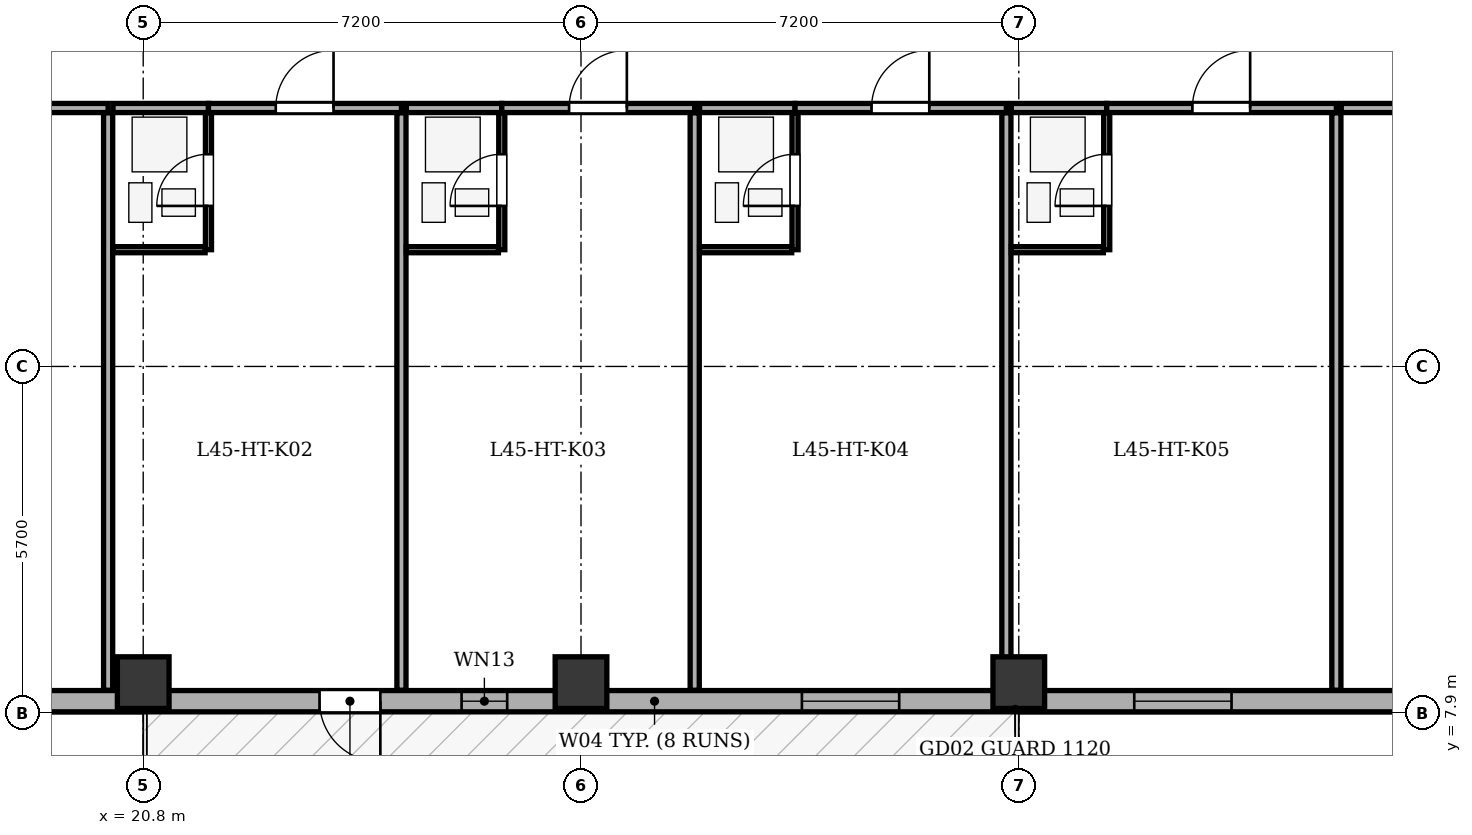
"""IFC4 building model, lengths in metres.
Left out: names, types, materials, properties, quantities, classifications, styles, units other than length and angle.
Written with IfcOpenShell. Run it as: python <this file> out.ifc"""

import sys

from ifc_helpers import new_model, si_unit, direction, frame, frame_2d, origin, origin_2d, place, context, subcontext, project, spatial, rectangle, extrude, element, fill, save


model = new_model("IFC4")
c1 = context("Model", 3, precision=1e-05, world=origin(), true_north=direction((0.0, 1.0)))
c2 = subcontext(c1, "Body", "Model", "MODEL_VIEW")
j1 = project(units=[si_unit("LENGTHUNIT", "METRE"), si_unit("PLANEANGLEUNIT", "RADIAN")], contexts=[c1])
p1 = place(None, origin())
s1 = spatial("IfcSite", under=j1, at=p1, CompositionType="ELEMENT")
p2 = place(p1, origin())
s2 = spatial("IfcBuilding", under=s1, at=p2, CompositionType="ELEMENT")
p3 = place(p2, frame((0.0, 0.0, 176.3)))
s3 = spatial("IfcBuildingStorey", under=s2, at=p3, CompositionType="ELEMENT", Elevation=176.3)
for number, where, z_axis, x_axis in (
    (1, (20.8, 8.4, 0.0), (0.0, 0.0, 1.0), (1.0, 0.0, 0.0)),
    (2, (28.0, 8.4, 0.0), (0.0, 0.0, 1.0), (1.0, 0.0, 0.0)),
    (3, (35.2, 8.4, 0.0), (0.0, 0.0, 1.0), (1.0, 0.0, 0.0)),
):
    element("IfcColumn", number, at=place(p3, frame(where, z_axis=z_axis, x_axis=x_axis)), inside=s3, PredefinedType="COLUMN", context=c2, shape_type="SweptSolid", body=[
        extrude(rectangle(XDim=0.85, YDim=0.85, at=origin_2d()), origin(), (0.0, 0.0, 1.0), 3.5),
    ])
p4 = place(p3, frame((50.7, 8.095, 0.0), z_axis=(0.0, 0.0, 1.0), x_axis=(-1.0, 0.0, 0.0)))
e4 = element("IfcWall", 4, at=p4, inside=s3, PredefinedType="STANDARD", context=c2, shape_type="SweptSolid", body=[
    extrude(rectangle(XDim=35.0, YDim=0.35, at=frame_2d((17.5, 0.0))), origin(), (0.0, 0.0, 1.0), 2.785),
])
p5 = place(p4, frame((26.0, 0.0, 0.0)))
e5 = element("IfcOpeningElement", 5, at=p5, cuts=e4, PredefinedType="OPENING", context=c2, shape_type="SweptSolid", body=[
    extrude(rectangle(XDim=1.0, YDim=2.02, at=frame_2d((0.5, 1.01))), frame((0.0, 0.185, 0.0), z_axis=(0.0, -1.0, 0.0), x_axis=(1.0, 0.0, 0.0)), (0.0, 0.0, 1.0), 0.37),
])
p6 = place(p4, frame((1.763, 0.0, 0.75)))
e6 = element("IfcOpeningElement", 6, at=p6, cuts=e4, PredefinedType="OPENING", context=c2, shape_type="SweptSolid", body=[
    extrude(rectangle(XDim=1.6, YDim=1.75, at=frame_2d((0.8, 0.875))), frame((0.0, 0.185, 0.0), z_axis=(0.0, -1.0, 0.0), x_axis=(1.0, 0.0, 0.0)), (0.0, 0.0, 1.0), 0.37),
])
p7 = place(p4, frame((6.764, 0.0, 0.75)))
e7 = element("IfcOpeningElement", 7, at=p7, cuts=e4, PredefinedType="OPENING", context=c2, shape_type="SweptSolid", body=[
    extrude(rectangle(XDim=1.6, YDim=1.75, at=frame_2d((0.8, 0.875))), frame((0.0, 0.185, 0.0), z_axis=(0.0, -1.0, 0.0), x_axis=(1.0, 0.0, 0.0)), (0.0, 0.0, 1.0), 0.37),
])
p8 = place(p4, frame((12.001, 0.0, 0.75)))
e8 = element("IfcOpeningElement", 8, at=p8, cuts=e4, PredefinedType="OPENING", context=c2, shape_type="SweptSolid", body=[
    extrude(rectangle(XDim=1.6, YDim=1.75, at=frame_2d((0.8, 0.875))), frame((0.0, 0.185, 0.0), z_axis=(0.0, -1.0, 0.0), x_axis=(1.0, 0.0, 0.0)), (0.0, 0.0, 1.0), 0.37),
])
p9 = place(p4, frame((17.467, 0.0, 0.75)))
e9 = element("IfcOpeningElement", 9, at=p9, cuts=e4, PredefinedType="OPENING", context=c2, shape_type="SweptSolid", body=[
    extrude(rectangle(XDim=1.6, YDim=1.75, at=frame_2d((0.8, 0.875))), frame((0.0, 0.185, 0.0), z_axis=(0.0, -1.0, 0.0), x_axis=(1.0, 0.0, 0.0)), (0.0, 0.0, 1.0), 0.37),
])
p10 = place(p4, frame((31.801, 0.0, 0.75)))
e10 = element("IfcOpeningElement", 10, at=p10, cuts=e4, PredefinedType="OPENING", context=c2, shape_type="SweptSolid", body=[
    extrude(rectangle(XDim=1.6, YDim=1.75, at=frame_2d((0.8, 0.875))), frame((0.0, 0.185, 0.0), z_axis=(0.0, -1.0, 0.0), x_axis=(1.0, 0.0, 0.0)), (0.0, 0.0, 1.0), 0.37),
])
p11 = place(p4, frame((23.914, 0.0, 0.75)))
e11 = element("IfcOpeningElement", 11, at=p11, cuts=e4, PredefinedType="OPENING", context=c2, shape_type="SweptSolid", body=[
    extrude(rectangle(XDim=0.75, YDim=1.45, at=frame_2d((0.375, 0.725))), frame((0.0, 0.185, 0.0), z_axis=(0.0, -1.0, 0.0), x_axis=(1.0, 0.0, 0.0)), (0.0, 0.0, 1.0), 0.37),
])
p12 = place(p3, frame((17.35, 17.85, 0.0), z_axis=(0.0, 0.0, 1.0), x_axis=(1.0, 0.0, 0.0)))
e12 = element("IfcWall", 12, at=p12, inside=s3, PredefinedType="PARTITIONING", context=c2, shape_type="SweptSolid", body=[
    extrude(rectangle(XDim=2.873, YDim=0.15, at=frame_2d((1.437, 0.0))), origin(), (0.0, 0.0, 1.0), 3.2),
])
p13 = place(p12, frame((0.957, 0.0, 0.0)))
e13 = element("IfcOpeningElement", 13, at=p13, cuts=e12, PredefinedType="OPENING", context=c2, shape_type="SweptSolid", body=[
    extrude(rectangle(XDim=0.95, YDim=2.1, at=frame_2d((0.475, 1.05))), frame((0.0, 0.085, 0.0), z_axis=(0.0, -1.0, 0.0), x_axis=(1.0, 0.0, 0.0)), (0.0, 0.0, 1.0), 0.17),
])
p14 = place(p3, frame((20.223, 8.275, 0.0), z_axis=(0.0, 0.0, 1.0), x_axis=(0.0, 1.0, 0.0)))
e14 = element("IfcWall", 14, at=p14, inside=s3, PredefinedType="PARTITIONING", context=c2, shape_type="SweptSolid", body=[
    extrude(rectangle(XDim=9.495, YDim=0.15, at=frame_2d((4.748, 0.0))), origin(), (0.0, 0.0, 1.0), 3.2),
])
p15 = place(p3, frame((20.303, 17.85, 0.0), z_axis=(0.0, 0.0, 1.0), x_axis=(1.0, 0.0, 0.0)))
e15 = element("IfcWall", 15, at=p15, inside=s3, PredefinedType="PARTITIONING", context=c2, shape_type="SweptSolid", body=[
    extrude(rectangle(XDim=1.57, YDim=0.15, at=frame_2d((0.785, 0.0))), origin(), (0.0, 0.0, 1.0), 3.2),
])
p16 = place(p3, frame((21.873, 17.85, 0.0), z_axis=(0.0, 0.0, 1.0), x_axis=(1.0, 0.0, 0.0)))
e16 = element("IfcWall", 16, at=p16, inside=s3, PredefinedType="PARTITIONING", context=c2, shape_type="SweptSolid", body=[
    extrude(rectangle(XDim=3.174, YDim=0.15, at=frame_2d((1.587, 0.0))), origin(), (0.0, 0.0, 1.0), 3.2),
])
p17 = place(p16, frame((1.107, 0.0, 0.0)))
e17 = element("IfcOpeningElement", 17, at=p17, cuts=e16, PredefinedType="OPENING", context=c2, shape_type="SweptSolid", body=[
    extrude(rectangle(XDim=0.95, YDim=2.1, at=frame_2d((0.475, 1.05))), frame((0.0, 0.085, 0.0), z_axis=(0.0, -1.0, 0.0), x_axis=(1.0, 0.0, 0.0)), (0.0, 0.0, 1.0), 0.17),
])
p18 = place(p3, frame((21.873, 15.52, 0.0), z_axis=(0.0, 0.0, 1.0), x_axis=(0.0, 1.0, 0.0)))
e18 = element("IfcWall", 18, at=p18, inside=s3, PredefinedType="PARTITIONING", context=c2, shape_type="SweptSolid", body=[
    extrude(rectangle(XDim=2.25, YDim=0.1, at=frame_2d((1.125, 0.0))), origin(), (0.0, 0.0, 1.0), 3.2),
])
p19 = place(p18, frame((0.72, 0.0, 0.0)))
e19 = element("IfcOpeningElement", 19, at=p19, cuts=e18, PredefinedType="OPENING", context=c2, shape_type="SweptSolid", body=[
    extrude(rectangle(XDim=0.85, YDim=2.05, at=frame_2d((0.425, 1.025))), frame((0.0, 0.06, 0.0), z_axis=(0.0, -1.0, 0.0), x_axis=(1.0, 0.0, 0.0)), (0.0, 0.0, 1.0), 0.12),
])
p20 = place(p3, frame((20.303, 15.52, 0.0), z_axis=(0.0, 0.0, 1.0), x_axis=(1.0, 0.0, 0.0)))
e20 = element("IfcWall", 20, at=p20, inside=s3, PredefinedType="PARTITIONING", context=c2, shape_type="SweptSolid", body=[
    extrude(rectangle(XDim=1.515, YDim=0.1, at=frame_2d((0.758, 0.0))), origin(), (0.0, 0.0, 1.0), 3.2),
])
p21 = place(p3, frame((25.047, 8.275, 0.0), z_axis=(0.0, 0.0, 1.0), x_axis=(0.0, 1.0, 0.0)))
e21 = element("IfcWall", 21, at=p21, inside=s3, PredefinedType="PARTITIONING", context=c2, shape_type="SweptSolid", body=[
    extrude(rectangle(XDim=9.495, YDim=0.15, at=frame_2d((4.748, 0.0))), origin(), (0.0, 0.0, 1.0), 3.2),
])
p22 = place(p3, frame((25.127, 17.85, 0.0), z_axis=(0.0, 0.0, 1.0), x_axis=(1.0, 0.0, 0.0)))
e22 = element("IfcWall", 22, at=p22, inside=s3, PredefinedType="PARTITIONING", context=c2, shape_type="SweptSolid", body=[
    extrude(rectangle(XDim=1.57, YDim=0.15, at=frame_2d((0.785, 0.0))), origin(), (0.0, 0.0, 1.0), 3.2),
])
p23 = place(p3, frame((26.697, 17.85, 0.0), z_axis=(0.0, 0.0, 1.0), x_axis=(1.0, 0.0, 0.0)))
e23 = element("IfcWall", 23, at=p23, inside=s3, PredefinedType="PARTITIONING", context=c2, shape_type="SweptSolid", body=[
    extrude(rectangle(XDim=3.173, YDim=0.15, at=frame_2d((1.586, 0.0))), origin(), (0.0, 0.0, 1.0), 3.2),
])
p24 = place(p23, frame((1.107, 0.0, 0.0)))
e24 = element("IfcOpeningElement", 24, at=p24, cuts=e23, PredefinedType="OPENING", context=c2, shape_type="SweptSolid", body=[
    extrude(rectangle(XDim=0.95, YDim=2.1, at=frame_2d((0.475, 1.05))), frame((0.0, 0.085, 0.0), z_axis=(0.0, -1.0, 0.0), x_axis=(1.0, 0.0, 0.0)), (0.0, 0.0, 1.0), 0.17),
])
p25 = place(p3, frame((26.697, 15.52, 0.0), z_axis=(0.0, 0.0, 1.0), x_axis=(0.0, 1.0, 0.0)))
e25 = element("IfcWall", 25, at=p25, inside=s3, PredefinedType="PARTITIONING", context=c2, shape_type="SweptSolid", body=[
    extrude(rectangle(XDim=2.25, YDim=0.1, at=frame_2d((1.125, 0.0))), origin(), (0.0, 0.0, 1.0), 3.2),
])
p26 = place(p25, frame((0.72, 0.0, 0.0)))
e26 = element("IfcOpeningElement", 26, at=p26, cuts=e25, PredefinedType="OPENING", context=c2, shape_type="SweptSolid", body=[
    extrude(rectangle(XDim=0.85, YDim=2.05, at=frame_2d((0.425, 1.025))), frame((0.0, 0.06, 0.0), z_axis=(0.0, -1.0, 0.0), x_axis=(1.0, 0.0, 0.0)), (0.0, 0.0, 1.0), 0.12),
])
p27 = place(p3, frame((25.127, 15.52, 0.0), z_axis=(0.0, 0.0, 1.0), x_axis=(1.0, 0.0, 0.0)))
e27 = element("IfcWall", 27, at=p27, inside=s3, PredefinedType="PARTITIONING", context=c2, shape_type="SweptSolid", body=[
    extrude(rectangle(XDim=1.515, YDim=0.1, at=frame_2d((0.758, 0.0))), origin(), (0.0, 0.0, 1.0), 3.2),
])
p28 = place(p3, frame((29.87, 8.275, 0.0), z_axis=(0.0, 0.0, 1.0), x_axis=(0.0, 1.0, 0.0)))
e28 = element("IfcWall", 28, at=p28, inside=s3, PredefinedType="PARTITIONING", context=c2, shape_type="SweptSolid", body=[
    extrude(rectangle(XDim=9.495, YDim=0.15, at=frame_2d((4.748, 0.0))), origin(), (0.0, 0.0, 1.0), 2.785),
])
p29 = place(p3, frame((29.95, 17.85, 0.0), z_axis=(0.0, 0.0, 1.0), x_axis=(1.0, 0.0, 0.0)))
e29 = element("IfcWall", 29, at=p29, inside=s3, PredefinedType="PARTITIONING", context=c2, shape_type="SweptSolid", body=[
    extrude(rectangle(XDim=1.57, YDim=0.15, at=frame_2d((0.785, 0.0))), origin(), (0.0, 0.0, 1.0), 3.2),
])
p30 = place(p3, frame((31.52, 17.85, 0.0), z_axis=(0.0, 0.0, 1.0), x_axis=(1.0, 0.0, 0.0)))
e30 = element("IfcWall", 30, at=p30, inside=s3, PredefinedType="PARTITIONING", context=c2, shape_type="SweptSolid", body=[
    extrude(rectangle(XDim=3.476, YDim=0.15, at=frame_2d((1.738, 0.0))), origin(), (0.0, 0.0, 1.0), 3.2),
])
p31 = place(p30, frame((1.258, 0.0, 0.0)))
e31 = element("IfcOpeningElement", 31, at=p31, cuts=e30, PredefinedType="OPENING", context=c2, shape_type="SweptSolid", body=[
    extrude(rectangle(XDim=0.95, YDim=2.1, at=frame_2d((0.475, 1.05))), frame((0.0, 0.085, 0.0), z_axis=(0.0, -1.0, 0.0), x_axis=(1.0, 0.0, 0.0)), (0.0, 0.0, 1.0), 0.17),
])
p32 = place(p3, frame((31.52, 15.52, 0.0), z_axis=(0.0, 0.0, 1.0), x_axis=(0.0, 1.0, 0.0)))
e32 = element("IfcWall", 32, at=p32, inside=s3, PredefinedType="PARTITIONING", context=c2, shape_type="SweptSolid", body=[
    extrude(rectangle(XDim=2.25, YDim=0.1, at=frame_2d((1.125, 0.0))), origin(), (0.0, 0.0, 1.0), 3.2),
])
p33 = place(p32, frame((0.72, 0.0, 0.0)))
e33 = element("IfcOpeningElement", 33, at=p33, cuts=e32, PredefinedType="OPENING", context=c2, shape_type="SweptSolid", body=[
    extrude(rectangle(XDim=0.85, YDim=2.05, at=frame_2d((0.425, 1.025))), frame((0.0, 0.06, 0.0), z_axis=(0.0, -1.0, 0.0), x_axis=(1.0, 0.0, 0.0)), (0.0, 0.0, 1.0), 0.12),
])
p34 = place(p3, frame((29.95, 15.52, 0.0), z_axis=(0.0, 0.0, 1.0), x_axis=(1.0, 0.0, 0.0)))
e34 = element("IfcWall", 34, at=p34, inside=s3, PredefinedType="PARTITIONING", context=c2, shape_type="SweptSolid", body=[
    extrude(rectangle(XDim=1.515, YDim=0.1, at=frame_2d((0.758, 0.0))), origin(), (0.0, 0.0, 1.0), 3.2),
])
p35 = place(p3, frame((34.996, 8.275, 0.0), z_axis=(0.0, 0.0, 1.0), x_axis=(0.0, 1.0, 0.0)))
e35 = element("IfcWall", 35, at=p35, inside=s3, PredefinedType="PARTITIONING", context=c2, shape_type="SweptSolid", body=[
    extrude(rectangle(XDim=9.495, YDim=0.15, at=frame_2d((4.748, 0.0))), origin(), (0.0, 0.0, 1.0), 2.535),
])
p36 = place(p3, frame((35.076, 17.85, 0.0), z_axis=(0.0, 0.0, 1.0), x_axis=(1.0, 0.0, 0.0)))
e36 = element("IfcWall", 36, at=p36, inside=s3, PredefinedType="PARTITIONING", context=c2, shape_type="SweptSolid", body=[
    extrude(rectangle(XDim=1.57, YDim=0.15, at=frame_2d((0.785, 0.0))), origin(), (0.0, 0.0, 1.0), 3.2),
])
p37 = place(p3, frame((36.646, 17.85, 0.0), z_axis=(0.0, 0.0, 1.0), x_axis=(1.0, 0.0, 0.0)))
e37 = element("IfcWall", 37, at=p37, inside=s3, PredefinedType="PARTITIONING", context=c2, shape_type="SweptSolid", body=[
    extrude(rectangle(XDim=3.777, YDim=0.15, at=frame_2d((1.889, 0.0))), origin(), (0.0, 0.0, 1.0), 3.2),
])
p38 = place(p37, frame((1.409, 0.0, 0.0)))
e38 = element("IfcOpeningElement", 38, at=p38, cuts=e37, PredefinedType="OPENING", context=c2, shape_type="SweptSolid", body=[
    extrude(rectangle(XDim=0.95, YDim=2.1, at=frame_2d((0.475, 1.05))), frame((0.0, 0.085, 0.0), z_axis=(0.0, -1.0, 0.0), x_axis=(1.0, 0.0, 0.0)), (0.0, 0.0, 1.0), 0.17),
])
p39 = place(p3, frame((36.646, 15.52, 0.0), z_axis=(0.0, 0.0, 1.0), x_axis=(0.0, 1.0, 0.0)))
e39 = element("IfcWall", 39, at=p39, inside=s3, PredefinedType="PARTITIONING", context=c2, shape_type="SweptSolid", body=[
    extrude(rectangle(XDim=2.25, YDim=0.1, at=frame_2d((1.125, 0.0))), origin(), (0.0, 0.0, 1.0), 3.2),
])
p40 = place(p39, frame((0.72, 0.0, 0.0)))
e40 = element("IfcOpeningElement", 40, at=p40, cuts=e39, PredefinedType="OPENING", context=c2, shape_type="SweptSolid", body=[
    extrude(rectangle(XDim=0.85, YDim=2.05, at=frame_2d((0.425, 1.025))), frame((0.0, 0.06, 0.0), z_axis=(0.0, -1.0, 0.0), x_axis=(1.0, 0.0, 0.0)), (0.0, 0.0, 1.0), 0.12),
])
p41 = place(p3, frame((35.076, 15.52, 0.0), z_axis=(0.0, 0.0, 1.0), x_axis=(1.0, 0.0, 0.0)))
e41 = element("IfcWall", 41, at=p41, inside=s3, PredefinedType="PARTITIONING", context=c2, shape_type="SweptSolid", body=[
    extrude(rectangle(XDim=1.515, YDim=0.1, at=frame_2d((0.758, 0.0))), origin(), (0.0, 0.0, 1.0), 3.2),
])
p42 = place(p3, frame((40.423, 8.275, 0.0), z_axis=(0.0, 0.0, 1.0), x_axis=(0.0, 1.0, 0.0)))
e42 = element("IfcWall", 42, at=p42, inside=s3, PredefinedType="PARTITIONING", context=c2, shape_type="SweptSolid", body=[
    extrude(rectangle(XDim=9.495, YDim=0.15, at=frame_2d((4.748, 0.0))), origin(), (0.0, 0.0, 1.0), 3.2),
])
p43 = place(p3, frame((40.503, 17.85, 0.0), z_axis=(0.0, 0.0, 1.0), x_axis=(1.0, 0.0, 0.0)))
e43 = element("IfcWall", 43, at=p43, inside=s3, PredefinedType="PARTITIONING", context=c2, shape_type="SweptSolid", body=[
    extrude(rectangle(XDim=5.347, YDim=0.15, at=frame_2d((2.674, 0.0))), origin(), (0.0, 0.0, 1.0), 3.2),
])
p44 = place(p43, frame((2.114, 0.0, 0.0)))
e44 = element("IfcOpeningElement", 44, at=p44, cuts=e43, PredefinedType="OPENING", context=c2, shape_type="SweptSolid", body=[
    extrude(rectangle(XDim=1.0, YDim=2.1, at=frame_2d((0.5, 1.05))), frame((0.0, 0.085, 0.0), z_axis=(0.0, -1.0, 0.0), x_axis=(1.0, 0.0, 0.0)), (0.0, 0.0, 1.0), 0.17),
])
p45 = place(p5, origin())
e45 = element("IfcDoor", 45, at=p45, inside=s3, OperationType="SINGLE_SWING_LEFT", PredefinedType="DOOR", context=c2, shape_type="SweptSolid", body=[
    extrude(rectangle(XDim=1.0, YDim=2.02, at=frame_2d((0.5, 1.01))), frame((0.0, 0.025, 0.0), z_axis=(0.0, -1.0, 0.0), x_axis=(1.0, 0.0, 0.0)), (0.0, 0.0, 1.0), 0.05),
])
fill(e5, e45)
p46 = place(p8, origin())
e46 = element("IfcWindow", 46, at=p46, inside=s3, PartitioningType="SINGLE_PANEL", PredefinedType="WINDOW", context=c2, shape_type="SweptSolid", body=[
    extrude(rectangle(XDim=1.6, YDim=1.75, at=frame_2d((0.8, 0.875))), frame((0.0, -0.01, 0.0), z_axis=(0.0, -1.0, 0.0), x_axis=(1.0, 0.0, 0.0)), (0.0, 0.0, 1.0), 0.06),
])
fill(e8, e46)
p47 = place(p9, origin())
e47 = element("IfcWindow", 47, at=p47, inside=s3, PartitioningType="SINGLE_PANEL", PredefinedType="WINDOW", context=c2, shape_type="SweptSolid", body=[
    extrude(rectangle(XDim=1.6, YDim=1.75, at=frame_2d((0.8, 0.875))), frame((0.0, -0.01, 0.0), z_axis=(0.0, -1.0, 0.0), x_axis=(1.0, 0.0, 0.0)), (0.0, 0.0, 1.0), 0.06),
])
fill(e9, e47)
p48 = place(p11, origin())
e48 = element("IfcWindow", 48, at=p48, inside=s3, PartitioningType="SINGLE_PANEL", PredefinedType="WINDOW", context=c2, shape_type="SweptSolid", body=[
    extrude(rectangle(XDim=0.75, YDim=1.45, at=frame_2d((0.375, 0.725))), frame((0.0, -0.01, 0.0), z_axis=(0.0, -1.0, 0.0), x_axis=(1.0, 0.0, 0.0)), (0.0, 0.0, 1.0), 0.06),
])
fill(e11, e48)
p49 = place(p19, origin())
e49 = element("IfcDoor", 49, at=p49, inside=s3, OperationType="SINGLE_SWING_LEFT", PredefinedType="DOOR", context=c2, shape_type="SweptSolid", body=[
    extrude(rectangle(XDim=0.85, YDim=2.05, at=frame_2d((0.425, 1.025))), frame((0.0, 0.025, 0.0), z_axis=(0.0, -1.0, 0.0), x_axis=(1.0, 0.0, 0.0)), (0.0, 0.0, 1.0), 0.05),
])
fill(e19, e49)
p50 = place(p17, origin())
e50 = element("IfcDoor", 50, at=p50, inside=s3, OperationType="SINGLE_SWING_RIGHT", PredefinedType="DOOR", context=c2, shape_type="SweptSolid", body=[
    extrude(rectangle(XDim=0.95, YDim=2.1, at=frame_2d((0.475, 1.05))), frame((0.0, 0.025, 0.0), z_axis=(0.0, -1.0, 0.0), x_axis=(1.0, 0.0, 0.0)), (0.0, 0.0, 1.0), 0.05),
])
fill(e17, e50)
p51 = place(p26, origin())
e51 = element("IfcDoor", 51, at=p51, inside=s3, OperationType="SINGLE_SWING_LEFT", PredefinedType="DOOR", context=c2, shape_type="SweptSolid", body=[
    extrude(rectangle(XDim=0.85, YDim=2.05, at=frame_2d((0.425, 1.025))), frame((0.0, 0.025, 0.0), z_axis=(0.0, -1.0, 0.0), x_axis=(1.0, 0.0, 0.0)), (0.0, 0.0, 1.0), 0.05),
])
fill(e26, e51)
p52 = place(p24, origin())
e52 = element("IfcDoor", 52, at=p52, inside=s3, OperationType="SINGLE_SWING_RIGHT", PredefinedType="DOOR", context=c2, shape_type="SweptSolid", body=[
    extrude(rectangle(XDim=0.95, YDim=2.1, at=frame_2d((0.475, 1.05))), frame((0.0, 0.025, 0.0), z_axis=(0.0, -1.0, 0.0), x_axis=(1.0, 0.0, 0.0)), (0.0, 0.0, 1.0), 0.05),
])
fill(e24, e52)
p53 = place(p33, origin())
e53 = element("IfcDoor", 53, at=p53, inside=s3, OperationType="SINGLE_SWING_LEFT", PredefinedType="DOOR", context=c2, shape_type="SweptSolid", body=[
    extrude(rectangle(XDim=0.85, YDim=2.05, at=frame_2d((0.425, 1.025))), frame((0.0, 0.025, 0.0), z_axis=(0.0, -1.0, 0.0), x_axis=(1.0, 0.0, 0.0)), (0.0, 0.0, 1.0), 0.05),
])
fill(e33, e53)
p54 = place(p31, origin())
e54 = element("IfcDoor", 54, at=p54, inside=s3, OperationType="SINGLE_SWING_RIGHT", PredefinedType="DOOR", context=c2, shape_type="SweptSolid", body=[
    extrude(rectangle(XDim=0.95, YDim=2.1, at=frame_2d((0.475, 1.05))), frame((0.0, 0.025, 0.0), z_axis=(0.0, -1.0, 0.0), x_axis=(1.0, 0.0, 0.0)), (0.0, 0.0, 1.0), 0.05),
])
fill(e31, e54)
p55 = place(p40, origin())
e55 = element("IfcDoor", 55, at=p55, inside=s3, OperationType="SINGLE_SWING_LEFT", PredefinedType="DOOR", context=c2, shape_type="SweptSolid", body=[
    extrude(rectangle(XDim=0.85, YDim=2.05, at=frame_2d((0.425, 1.025))), frame((0.0, 0.025, 0.0), z_axis=(0.0, -1.0, 0.0), x_axis=(1.0, 0.0, 0.0)), (0.0, 0.0, 1.0), 0.05),
])
fill(e40, e55)
p56 = place(p38, origin())
e56 = element("IfcDoor", 56, at=p56, inside=s3, OperationType="SINGLE_SWING_RIGHT", PredefinedType="DOOR", context=c2, shape_type="SweptSolid", body=[
    extrude(rectangle(XDim=0.95, YDim=2.1, at=frame_2d((0.475, 1.05))), frame((0.0, 0.025, 0.0), z_axis=(0.0, -1.0, 0.0), x_axis=(1.0, 0.0, 0.0)), (0.0, 0.0, 1.0), 0.05),
])
fill(e38, e56)
save(model, sys.argv[1])
